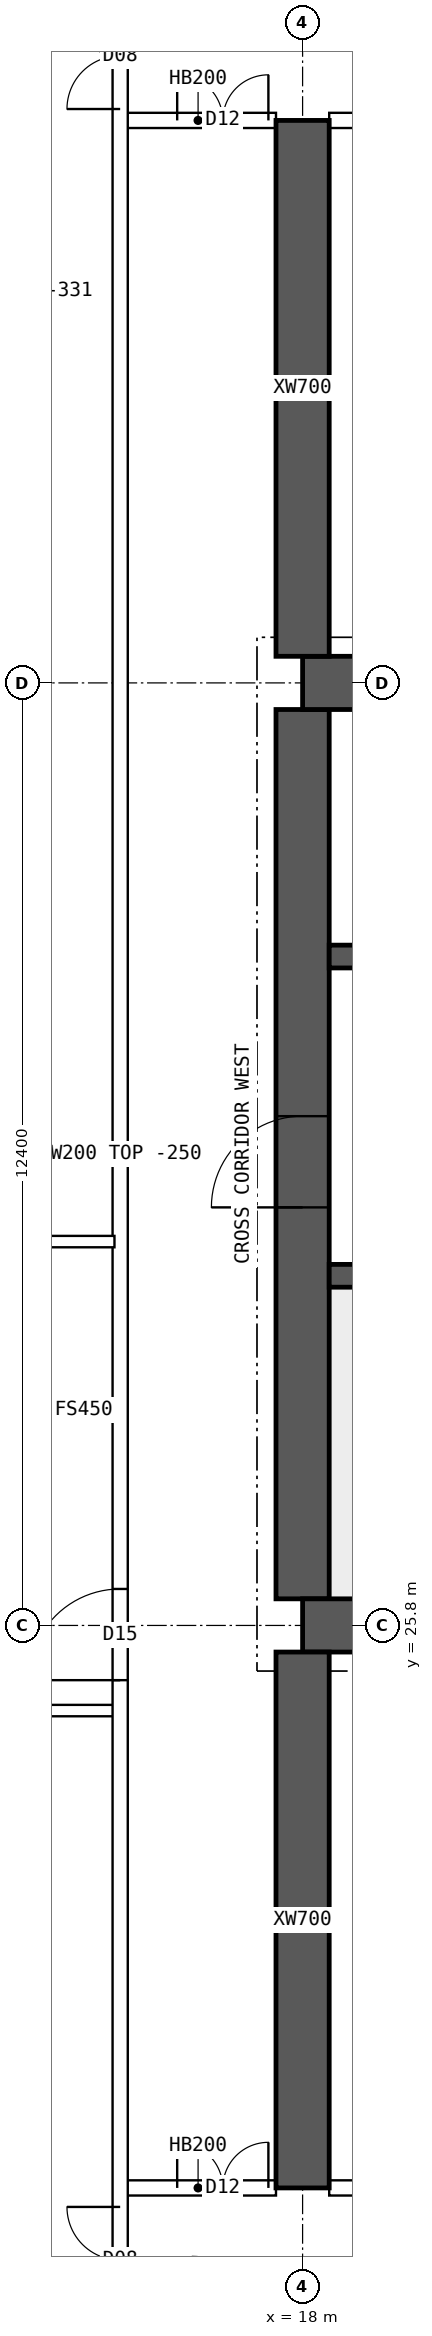
"""IFC4 building model, lengths in metres.
Left out: names, types, materials, properties, quantities, classifications, styles, units other than length and angle.
Written with IfcOpenShell. Run it as: python <this file> out.ifc"""

import sys

from ifc_helpers import new_model, si_unit, direction, frame, frame_2d, origin, place, context, subcontext, project, spatial, polyline, rectangle, outline, extrude, element, fill, save


model = new_model("IFC4")
c1 = context("Model", 3, precision=1e-05, world=origin(), true_north=direction((0.0, 1.0)))
c2 = subcontext(c1, "Body", "Model", "MODEL_VIEW")
j1 = project(units=[si_unit("LENGTHUNIT", "METRE"), si_unit("PLANEANGLEUNIT", "RADIAN")], contexts=[c1])
p1 = place(None, origin())
s1 = spatial("IfcSite", under=j1, at=p1, CompositionType="ELEMENT")
p2 = place(p1, origin())
s2 = spatial("IfcBuilding", under=s1, at=p2, CompositionType="ELEMENT")
p3 = place(p2, frame((0.0, 0.0, 231.55)))
s3 = spatial("IfcBuildingStorey", under=s2, at=p3, CompositionType="ELEMENT", Elevation=231.55)
for number, where, z_axis, x_axis in (
    (1, (18.0, 25.8, 0.0), (0.0, 0.0, 1.0), (1.0, 0.0, 0.0)),
    (2, (18.0, 38.2, 0.0), (0.0, 0.0, 1.0), (1.0, 0.0, 0.0)),
):
    element("IfcWall", number, at=place(p3, frame(where, z_axis=z_axis, x_axis=x_axis)), inside=s3, PredefinedType="SHEAR", context=c2, shape_type="SweptSolid", body=[
        extrude(rectangle(XDim=48.0, YDim=0.7, at=frame_2d((24.0, 0.0))), origin(), (0.0, 0.0, 1.0), 3.75),
    ])
p4 = place(p3, frame((18.0, 26.15, 0.0), z_axis=(0.0, 0.0, 1.0), x_axis=(0.0, 1.0, 0.0)))
e3 = element("IfcWall", 3, at=p4, inside=s3, PredefinedType="SHEAR", context=c2, shape_type="SweptSolid", body=[
    extrude(rectangle(XDim=11.7, YDim=0.7, at=frame_2d((5.85, 0.0))), origin(), (0.0, 0.0, 1.0), 3.75),
])
p5 = place(p4, frame((5.15, 0.0, 0.0)))
e4 = element("IfcOpeningElement", 4, at=p5, cuts=e3, PredefinedType="OPENING", context=c2, shape_type="SweptSolid", body=[
    extrude(rectangle(XDim=1.2, YDim=2.1, at=frame_2d((0.6, 1.05))), frame((0.0, 0.36, 0.0), z_axis=(0.0, -1.0, 0.0), x_axis=(1.0, 0.0, 0.0)), (0.0, 0.0, 1.0), 0.72),
])
p6 = place(p3, frame((18.35, 30.4, 0.0), z_axis=(0.0, 0.0, 1.0), x_axis=(1.0, 0.0, 0.0)))
e5 = element("IfcWall", 5, at=p6, inside=s3, PredefinedType="SHEAR", context=c2, shape_type="SweptSolid", body=[
    extrude(rectangle(XDim=47.3, YDim=0.3, at=frame_2d((23.65, 0.0))), origin(), (0.0, 0.0, 1.0), 3.75),
])
p7 = place(p6, frame((0.4, 0.0, 0.0)))
e6 = element("IfcOpeningElement", 6, at=p7, cuts=e5, PredefinedType="OPENING", context=c2, shape_type="SweptSolid", body=[
    extrude(rectangle(XDim=1.0, YDim=2.1, at=frame_2d((0.5, 1.05))), frame((0.0, 0.16, 0.0), z_axis=(0.0, -1.0, 0.0), x_axis=(1.0, 0.0, 0.0)), (0.0, 0.0, 1.0), 0.32),
])
p8 = place(p6, frame((45.9, 0.0, 0.0)))
e7 = element("IfcOpeningElement", 7, at=p8, cuts=e5, PredefinedType="OPENING", context=c2, shape_type="SweptSolid", body=[
    extrude(rectangle(XDim=1.0, YDim=2.1, at=frame_2d((0.5, 1.05))), frame((0.0, 0.16, 0.0), z_axis=(0.0, -1.0, 0.0), x_axis=(1.0, 0.0, 0.0)), (0.0, 0.0, 1.0), 0.32),
])
p9 = place(p6, frame((8.4, 0.0, 0.0)))
e8 = element("IfcOpeningElement", 8, at=p9, cuts=e5, PredefinedType="OPENING", context=c2, shape_type="SweptSolid", body=[
    extrude(rectangle(XDim=1.1, YDim=2.1, at=frame_2d((0.55, 1.05))), frame((0.0, 0.16, 0.0), z_axis=(0.0, -1.0, 0.0), x_axis=(1.0, 0.0, 0.0)), (0.0, 0.0, 1.0), 0.32),
])
p10 = place(p6, frame((11.0, 0.0, 0.0)))
e9 = element("IfcOpeningElement", 9, at=p10, cuts=e5, PredefinedType="OPENING", context=c2, shape_type="SweptSolid", body=[
    extrude(rectangle(XDim=1.1, YDim=2.1, at=frame_2d((0.55, 1.05))), frame((0.0, 0.16, 0.0), z_axis=(0.0, -1.0, 0.0), x_axis=(1.0, 0.0, 0.0)), (0.0, 0.0, 1.0), 0.32),
])
p11 = place(p6, frame((13.6, 0.0, 0.0)))
e10 = element("IfcOpeningElement", 10, at=p11, cuts=e5, PredefinedType="OPENING", context=c2, shape_type="SweptSolid", body=[
    extrude(rectangle(XDim=1.1, YDim=2.1, at=frame_2d((0.55, 1.05))), frame((0.0, 0.16, 0.0), z_axis=(0.0, -1.0, 0.0), x_axis=(1.0, 0.0, 0.0)), (0.0, 0.0, 1.0), 0.32),
])
p12 = place(p6, frame((16.2, 0.0, 0.0)))
e11 = element("IfcOpeningElement", 11, at=p12, cuts=e5, PredefinedType="OPENING", context=c2, shape_type="SweptSolid", body=[
    extrude(rectangle(XDim=1.1, YDim=2.1, at=frame_2d((0.55, 1.05))), frame((0.0, 0.16, 0.0), z_axis=(0.0, -1.0, 0.0), x_axis=(1.0, 0.0, 0.0)), (0.0, 0.0, 1.0), 0.32),
])
p13 = place(p6, frame((18.975, 0.0, 0.0)))
e12 = element("IfcOpeningElement", 12, at=p13, cuts=e5, PredefinedType="OPENING", context=c2, shape_type="SweptSolid", body=[
    extrude(rectangle(XDim=0.9, YDim=2.1, at=frame_2d((0.45, 1.05))), frame((0.0, 0.16, 0.0), z_axis=(0.0, -1.0, 0.0), x_axis=(1.0, 0.0, 0.0)), (0.0, 0.0, 1.0), 0.32),
])
p14 = place(p6, frame((24.475, 0.0, 0.0)))
e13 = element("IfcOpeningElement", 13, at=p14, cuts=e5, PredefinedType="OPENING", context=c2, shape_type="SweptSolid", body=[
    extrude(rectangle(XDim=0.9, YDim=2.1, at=frame_2d((0.45, 1.05))), frame((0.0, 0.16, 0.0), z_axis=(0.0, -1.0, 0.0), x_axis=(1.0, 0.0, 0.0)), (0.0, 0.0, 1.0), 0.32),
])
p15 = place(p6, frame((30.267, 0.0, 0.0)))
e14 = element("IfcOpeningElement", 14, at=p15, cuts=e5, PredefinedType="OPENING", context=c2, shape_type="SweptSolid", body=[
    extrude(rectangle(XDim=1.1, YDim=2.1, at=frame_2d((0.55, 1.05))), frame((0.0, 0.16, 0.0), z_axis=(0.0, -1.0, 0.0), x_axis=(1.0, 0.0, 0.0)), (0.0, 0.0, 1.0), 0.32),
])
p16 = place(p6, frame((33.8, 0.0, 0.0)))
e15 = element("IfcOpeningElement", 15, at=p16, cuts=e5, PredefinedType="OPENING", context=c2, shape_type="SweptSolid", body=[
    extrude(rectangle(XDim=1.1, YDim=2.1, at=frame_2d((0.55, 1.05))), frame((0.0, 0.16, 0.0), z_axis=(0.0, -1.0, 0.0), x_axis=(1.0, 0.0, 0.0)), (0.0, 0.0, 1.0), 0.32),
])
p17 = place(p6, frame((37.333, 0.0, 0.0)))
e16 = element("IfcOpeningElement", 16, at=p17, cuts=e5, PredefinedType="OPENING", context=c2, shape_type="SweptSolid", body=[
    extrude(rectangle(XDim=1.1, YDim=2.1, at=frame_2d((0.55, 1.05))), frame((0.0, 0.16, 0.0), z_axis=(0.0, -1.0, 0.0), x_axis=(1.0, 0.0, 0.0)), (0.0, 0.0, 1.0), 0.32),
])
p18 = place(p3, frame((18.35, 34.6, 0.0), z_axis=(0.0, 0.0, 1.0), x_axis=(1.0, 0.0, 0.0)))
e17 = element("IfcWall", 17, at=p18, inside=s3, PredefinedType="SHEAR", context=c2, shape_type="SweptSolid", body=[
    extrude(rectangle(XDim=47.3, YDim=0.3, at=frame_2d((23.65, 0.0))), origin(), (0.0, 0.0, 1.0), 3.75),
])
p19 = place(p18, frame((0.9, 0.0, 0.0)))
e18 = element("IfcOpeningElement", 18, at=p19, cuts=e17, PredefinedType="OPENING", context=c2, shape_type="SweptSolid", body=[
    extrude(rectangle(XDim=1.1, YDim=2.1, at=frame_2d((0.55, 1.05))), frame((0.0, 0.16, 0.0), z_axis=(0.0, -1.0, 0.0), x_axis=(1.0, 0.0, 0.0)), (0.0, 0.0, 1.0), 0.32),
])
p20 = place(p18, frame((45.3, 0.0, 0.0)))
e19 = element("IfcOpeningElement", 19, at=p20, cuts=e17, PredefinedType="OPENING", context=c2, shape_type="SweptSolid", body=[
    extrude(rectangle(XDim=1.1, YDim=2.1, at=frame_2d((0.55, 1.05))), frame((0.0, 0.16, 0.0), z_axis=(0.0, -1.0, 0.0), x_axis=(1.0, 0.0, 0.0)), (0.0, 0.0, 1.0), 0.32),
])
p21 = place(p18, frame((4.25, 0.0, 0.0)))
e20 = element("IfcOpeningElement", 20, at=p21, cuts=e17, PredefinedType="OPENING", context=c2, shape_type="SweptSolid", body=[
    extrude(rectangle(XDim=0.9, YDim=2.1, at=frame_2d((0.45, 1.05))), frame((0.0, 0.16, 0.0), z_axis=(0.0, -1.0, 0.0), x_axis=(1.0, 0.0, 0.0)), (0.0, 0.0, 1.0), 0.32),
])
p22 = place(p18, frame((42.15, 0.0, 0.0)))
e21 = element("IfcOpeningElement", 21, at=p22, cuts=e17, PredefinedType="OPENING", context=c2, shape_type="SweptSolid", body=[
    extrude(rectangle(XDim=0.9, YDim=2.1, at=frame_2d((0.45, 1.05))), frame((0.0, 0.16, 0.0), z_axis=(0.0, -1.0, 0.0), x_axis=(1.0, 0.0, 0.0)), (0.0, 0.0, 1.0), 0.32),
])
p23 = place(p18, frame((9.025, 0.0, 0.0)))
e22 = element("IfcOpeningElement", 22, at=p23, cuts=e17, PredefinedType="OPENING", context=c2, shape_type="SweptSolid", body=[
    extrude(rectangle(XDim=0.9, YDim=2.1, at=frame_2d((0.45, 1.05))), frame((0.0, 0.16, 0.0), z_axis=(0.0, -1.0, 0.0), x_axis=(1.0, 0.0, 0.0)), (0.0, 0.0, 1.0), 0.32),
])
p24 = place(p18, frame((12.999, 0.0, 0.0)))
e23 = element("IfcOpeningElement", 23, at=p24, cuts=e17, PredefinedType="OPENING", context=c2, shape_type="SweptSolid", body=[
    extrude(rectangle(XDim=0.9, YDim=2.1, at=frame_2d((0.45, 1.05))), frame((0.0, 0.16, 0.0), z_axis=(0.0, -1.0, 0.0), x_axis=(1.0, 0.0, 0.0)), (0.0, 0.0, 1.0), 0.32),
])
p25 = place(p18, frame((16.646, 0.0, 0.0)))
e24 = element("IfcOpeningElement", 24, at=p25, cuts=e17, PredefinedType="OPENING", context=c2, shape_type="SweptSolid", body=[
    extrude(rectangle(XDim=0.9, YDim=2.1, at=frame_2d((0.45, 1.05))), frame((0.0, 0.16, 0.0), z_axis=(0.0, -1.0, 0.0), x_axis=(1.0, 0.0, 0.0)), (0.0, 0.0, 1.0), 0.32),
])
p26 = place(p18, frame((20.405, 0.0, 0.0)))
e25 = element("IfcOpeningElement", 25, at=p26, cuts=e17, PredefinedType="OPENING", context=c2, shape_type="SweptSolid", body=[
    extrude(rectangle(XDim=0.9, YDim=2.1, at=frame_2d((0.45, 1.05))), frame((0.0, 0.16, 0.0), z_axis=(0.0, -1.0, 0.0), x_axis=(1.0, 0.0, 0.0)), (0.0, 0.0, 1.0), 0.32),
])
p27 = place(p18, frame((24.811, 0.0, 0.0)))
e26 = element("IfcOpeningElement", 26, at=p27, cuts=e17, PredefinedType="OPENING", context=c2, shape_type="SweptSolid", body=[
    extrude(rectangle(XDim=0.9, YDim=2.1, at=frame_2d((0.45, 1.05))), frame((0.0, 0.16, 0.0), z_axis=(0.0, -1.0, 0.0), x_axis=(1.0, 0.0, 0.0)), (0.0, 0.0, 1.0), 0.32),
])
p28 = place(p18, frame((27.608, 0.0, 0.0)))
e27 = element("IfcOpeningElement", 27, at=p28, cuts=e17, PredefinedType="OPENING", context=c2, shape_type="SweptSolid", body=[
    extrude(rectangle(XDim=0.9, YDim=2.1, at=frame_2d((0.45, 1.05))), frame((0.0, 0.16, 0.0), z_axis=(0.0, -1.0, 0.0), x_axis=(1.0, 0.0, 0.0)), (0.0, 0.0, 1.0), 0.32),
])
p29 = place(p18, frame((33.729, 0.0, 0.0)))
e28 = element("IfcOpeningElement", 28, at=p29, cuts=e17, PredefinedType="OPENING", context=c2, shape_type="SweptSolid", body=[
    extrude(rectangle(XDim=0.9, YDim=2.1, at=frame_2d((0.45, 1.05))), frame((0.0, 0.16, 0.0), z_axis=(0.0, -1.0, 0.0), x_axis=(1.0, 0.0, 0.0)), (0.0, 0.0, 1.0), 0.32),
])
for number, where, z_axis, x_axis in (
    (29, (18.0, 18.4, 0.0), (0.0, 0.0, 1.0), (0.0, 1.0, 0.0)),
    (30, (18.0, 38.55, 0.0), (0.0, 0.0, 1.0), (0.0, 1.0, 0.0)),
):
    element("IfcWall", number, at=place(p3, frame(where, z_axis=z_axis, x_axis=x_axis)), inside=s3, PredefinedType="SHEAR", context=c2, shape_type="SweptSolid", body=[
        extrude(rectangle(XDim=7.05, YDim=0.7, at=frame_2d((3.525, 0.0))), origin(), (0.0, 0.0, 1.0), 3.75),
    ])
p30 = place(p3, frame((15.6, 18.4, 0.0), z_axis=(0.0, 0.0, 1.0), x_axis=(1.0, 0.0, 0.0)))
e31 = element("IfcWall", 31, at=p30, inside=s3, PredefinedType="SOLIDWALL", context=c2, shape_type="SweptSolid", body=[
    extrude(rectangle(XDim=2.05, YDim=0.2, at=frame_2d((1.025, 0.0))), origin(), (0.0, 0.0, 1.0), 3.5),
])
p31 = place(p30, frame((0.75, 0.0, 0.0)))
e32 = element("IfcOpeningElement", 32, at=p31, cuts=e31, PredefinedType="OPENING", context=c2, shape_type="SweptSolid", body=[
    extrude(rectangle(XDim=1.2, YDim=2.1, at=frame_2d((0.6, 1.05))), frame((0.0, 0.11, 0.0), z_axis=(0.0, -1.0, 0.0), x_axis=(1.0, 0.0, 0.0)), (0.0, 0.0, 1.0), 0.22),
])
p32 = place(p3, frame((18.35, 18.4, 0.0), z_axis=(0.0, 0.0, 1.0), x_axis=(1.0, 0.0, 0.0)))
e33 = element("IfcWall", 33, at=p32, inside=s3, PredefinedType="SOLIDWALL", context=c2, shape_type="SweptSolid", body=[
    extrude(rectangle(XDim=5.3, YDim=0.2, at=frame_2d((2.65, 0.0))), origin(), (0.0, 0.0, 1.0), 3.5),
])
p33 = place(p32, frame((0.35, 0.0, 0.0)))
e34 = element("IfcOpeningElement", 34, at=p33, cuts=e33, PredefinedType="OPENING", context=c2, shape_type="SweptSolid", body=[
    extrude(rectangle(XDim=0.9, YDim=2.1, at=frame_2d((0.45, 1.05))), frame((0.0, 0.11, 0.0), z_axis=(0.0, -1.0, 0.0), x_axis=(1.0, 0.0, 0.0)), (0.0, 0.0, 1.0), 0.22),
])
p34 = place(p32, frame((3.2, 0.0, 0.0)))
e35 = element("IfcOpeningElement", 35, at=p34, cuts=e33, PredefinedType="OPENING", context=c2, shape_type="SweptSolid", body=[
    extrude(rectangle(XDim=0.9, YDim=2.1, at=frame_2d((0.45, 1.05))), frame((0.0, 0.11, 0.0), z_axis=(0.0, -1.0, 0.0), x_axis=(1.0, 0.0, 0.0)), (0.0, 0.0, 1.0), 0.22),
])
p35 = place(p3, frame((15.6, 45.6, 0.0), z_axis=(0.0, 0.0, 1.0), x_axis=(1.0, 0.0, 0.0)))
e36 = element("IfcWall", 36, at=p35, inside=s3, PredefinedType="SOLIDWALL", context=c2, shape_type="SweptSolid", body=[
    extrude(rectangle(XDim=2.05, YDim=0.2, at=frame_2d((1.025, 0.0))), origin(), (0.0, 0.0, 1.0), 3.5),
])
p36 = place(p35, frame((0.75, 0.0, 0.0)))
e37 = element("IfcOpeningElement", 37, at=p36, cuts=e36, PredefinedType="OPENING", context=c2, shape_type="SweptSolid", body=[
    extrude(rectangle(XDim=1.2, YDim=2.1, at=frame_2d((0.6, 1.05))), frame((0.0, 0.11, 0.0), z_axis=(0.0, -1.0, 0.0), x_axis=(1.0, 0.0, 0.0)), (0.0, 0.0, 1.0), 0.22),
])
p37 = place(p3, frame((18.35, 45.6, 0.0), z_axis=(0.0, 0.0, 1.0), x_axis=(1.0, 0.0, 0.0)))
e38 = element("IfcWall", 38, at=p37, inside=s3, PredefinedType="SOLIDWALL", context=c2, shape_type="SweptSolid", body=[
    extrude(rectangle(XDim=5.3, YDim=0.2, at=frame_2d((2.65, 0.0))), origin(), (0.0, 0.0, 1.0), 3.5),
])
p38 = place(p37, frame((0.8, 0.0, 0.0)))
e39 = element("IfcOpeningElement", 39, at=p38, cuts=e38, PredefinedType="OPENING", context=c2, shape_type="SweptSolid", body=[
    extrude(rectangle(XDim=1.0, YDim=2.1, at=frame_2d((0.5, 1.05))), frame((0.0, 0.11, 0.0), z_axis=(0.0, -1.0, 0.0), x_axis=(1.0, 0.0, 0.0)), (0.0, 0.0, 1.0), 0.22),
])
p39 = place(p3, frame((8.705, 30.85, 0.0), z_axis=(0.0, 0.0, 1.0), x_axis=(1.0, 0.0, 0.0)))
e40 = element("IfcWall", 40, at=p39, inside=s3, PredefinedType="PARTITIONING", context=c2, shape_type="SweptSolid", body=[
    extrude(outline(polyline([(0.0, 0.0), (6.82, 0.0), (6.82, 3.5), (3.597, 3.5), (3.595, 3.05), (2.997, 3.05), (2.995, 3.5), (0.0, 3.5), (0.0, 0.0)])), frame((0.0, 0.075, 0.0), z_axis=(0.0, -1.0, 0.0), x_axis=(1.0, 0.0, 0.0)), (0.0, 0.0, 1.0), 0.15),
])
p40 = place(p3, frame((15.6, 11.646, 0.0), z_axis=(0.0, 0.0, 1.0), x_axis=(0.0, 1.0, 0.0)))
e41 = element("IfcWall", 41, at=p40, inside=s3, PredefinedType="SOLIDWALL", context=c2, shape_type="SweptSolid", body=[
    extrude(rectangle(XDim=40.708, YDim=0.2, at=frame_2d((20.354, 0.0))), origin(), (0.0, 0.0, 1.0), 3.5),
])
p41 = place(p40, frame((13.434, 0.0, 0.0)))
e42 = element("IfcOpeningElement", 42, at=p41, cuts=e41, PredefinedType="OPENING", context=c2, shape_type="SweptSolid", body=[
    extrude(rectangle(XDim=1.2, YDim=2.1, at=frame_2d((0.6, 1.05))), frame((0.0, 0.11, 0.0), z_axis=(0.0, -1.0, 0.0), x_axis=(1.0, 0.0, 0.0)), (0.0, 0.0, 1.0), 0.22),
])
p42 = place(p40, frame((5.104, 0.0, 0.0)))
e43 = element("IfcOpeningElement", 43, at=p42, cuts=e41, PredefinedType="OPENING", context=c2, shape_type="SweptSolid", body=[
    extrude(rectangle(XDim=1.4, YDim=2.1, at=frame_2d((0.7, 1.05))), frame((0.0, 0.11, 0.0), z_axis=(0.0, -1.0, 0.0), x_axis=(1.0, 0.0, 0.0)), (0.0, 0.0, 1.0), 0.22),
])
p43 = place(p40, frame((34.104, 0.0, 0.0)))
e44 = element("IfcOpeningElement", 44, at=p43, cuts=e41, PredefinedType="OPENING", context=c2, shape_type="SweptSolid", body=[
    extrude(rectangle(XDim=1.4, YDim=2.1, at=frame_2d((0.7, 1.05))), frame((0.0, 0.11, 0.0), z_axis=(0.0, -1.0, 0.0), x_axis=(1.0, 0.0, 0.0)), (0.0, 0.0, 1.0), 0.22),
])
p44 = place(p3, frame((8.705, 24.68, 0.0), z_axis=(0.0, 0.0, 1.0), x_axis=(1.0, 0.0, 0.0)))
e45 = element("IfcWall", 45, at=p44, inside=s3, PredefinedType="PARTITIONING", context=c2, shape_type="SweptSolid", body=[
    extrude(rectangle(XDim=6.82, YDim=0.15, at=frame_2d((3.41, 0.0))), origin(), (0.0, 0.0, 1.0), 3.5),
])
p45 = place(p5, origin())
e46 = element("IfcDoor", 46, at=p45, inside=s3, OperationType="SINGLE_SWING_LEFT", PredefinedType="DOOR", context=c2, shape_type="SweptSolid", body=[
    extrude(rectangle(XDim=1.2, YDim=2.1, at=frame_2d((0.6, 1.05))), frame((0.0, 0.025, 0.0), z_axis=(0.0, -1.0, 0.0), x_axis=(1.0, 0.0, 0.0)), (0.0, 0.0, 1.0), 0.05),
])
fill(e4, e46)
p46 = place(p31, origin())
e47 = element("IfcDoor", 47, at=p46, inside=s3, OperationType="DOUBLE_DOOR_SINGLE_SWING", PredefinedType="DOOR", context=c2, shape_type="SweptSolid", body=[
    extrude(rectangle(XDim=1.2, YDim=2.1, at=frame_2d((0.6, 1.05))), frame((0.0, 0.025, 0.0), z_axis=(0.0, -1.0, 0.0), x_axis=(1.0, 0.0, 0.0)), (0.0, 0.0, 1.0), 0.05),
])
fill(e32, e47)
p47 = place(p36, origin())
e48 = element("IfcDoor", 48, at=p47, inside=s3, OperationType="DOUBLE_DOOR_SINGLE_SWING", PredefinedType="DOOR", context=c2, shape_type="SweptSolid", body=[
    extrude(rectangle(XDim=1.2, YDim=2.1, at=frame_2d((0.6, 1.05))), frame((0.0, 0.025, 0.0), z_axis=(0.0, -1.0, 0.0), x_axis=(1.0, 0.0, 0.0)), (0.0, 0.0, 1.0), 0.05),
])
fill(e37, e48)
p48 = place(p41, origin())
e49 = element("IfcDoor", 49, at=p48, inside=s3, OperationType="SINGLE_SWING_LEFT", PredefinedType="DOOR", context=c2, shape_type="SweptSolid", body=[
    extrude(rectangle(XDim=1.2, YDim=2.1, at=frame_2d((0.6, 1.05))), frame((0.0, 0.025, 0.0), z_axis=(0.0, -1.0, 0.0), x_axis=(1.0, 0.0, 0.0)), (0.0, 0.0, 1.0), 0.05),
])
fill(e42, e49)
p49 = place(p42, origin())
e50 = element("IfcDoor", 50, at=p49, inside=s3, OperationType="DOUBLE_DOOR_SINGLE_SWING", PredefinedType="DOOR", context=c2, shape_type="SweptSolid", body=[
    extrude(rectangle(XDim=1.4, YDim=2.1, at=frame_2d((0.7, 1.05))), frame((0.0, 0.025, 0.0), z_axis=(0.0, -1.0, 0.0), x_axis=(1.0, 0.0, 0.0)), (0.0, 0.0, 1.0), 0.05),
])
fill(e43, e50)
p50 = place(p43, origin())
e51 = element("IfcDoor", 51, at=p50, inside=s3, OperationType="DOUBLE_DOOR_SINGLE_SWING", PredefinedType="DOOR", context=c2, shape_type="SweptSolid", body=[
    extrude(rectangle(XDim=1.4, YDim=2.1, at=frame_2d((0.7, 1.05))), frame((0.0, 0.025, 0.0), z_axis=(0.0, -1.0, 0.0), x_axis=(1.0, 0.0, 0.0)), (0.0, 0.0, 1.0), 0.05),
])
fill(e44, e51)
save(model, sys.argv[1])
